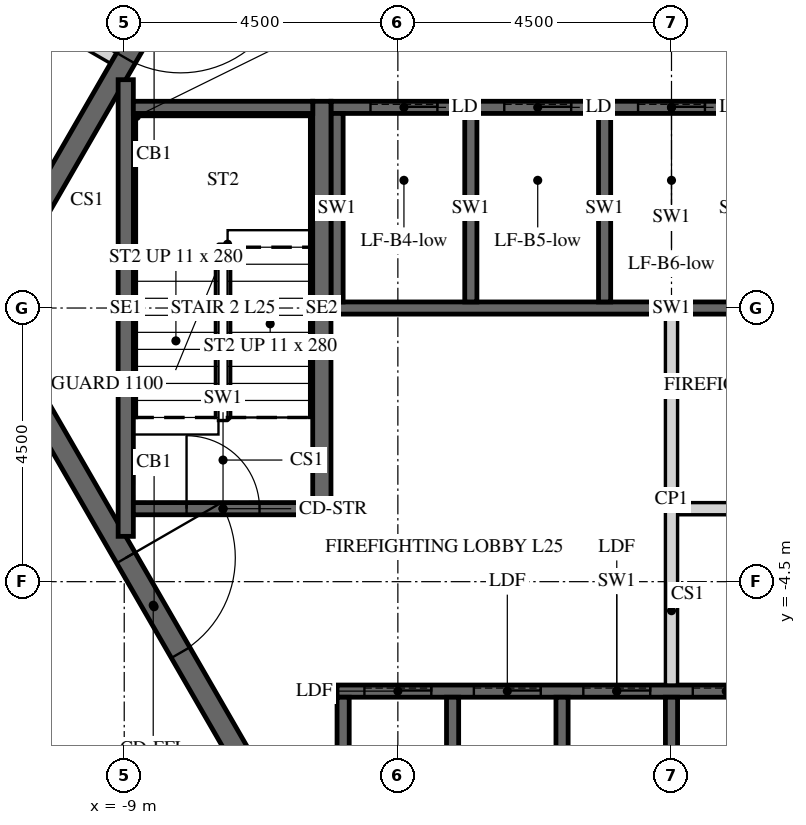
"""IFC4 building model, lengths in metres.
Left out: names, types, materials, properties, quantities, classifications, styles, units other than length and angle.
Written with IfcOpenShell. Run it as: python <this file> out.ifc"""

import sys

from ifc_helpers import new_model, si_unit, direction, frame, frame_2d, origin, place, context, subcontext, project, spatial, polyline, rectangle, outline, extrude, element, fill, save


model = new_model("IFC4")
c1 = context("Model", 3, precision=1e-05, world=origin(), true_north=direction((0.0, 1.0)))
c2 = subcontext(c1, "Body", "Model", "MODEL_VIEW")
j1 = project(units=[si_unit("LENGTHUNIT", "METRE"), si_unit("PLANEANGLEUNIT", "RADIAN")], contexts=[c1])
p1 = place(None, origin())
s1 = spatial("IfcSite", under=j1, at=p1, CompositionType="ELEMENT")
p2 = place(p1, origin())
s2 = spatial("IfcBuilding", under=s1, at=p2, CompositionType="ELEMENT")
p3 = place(p2, frame((0.0, 0.0, 111.6)))
s3 = spatial("IfcBuildingStorey", under=s2, at=p3, CompositionType="ELEMENT", Elevation=111.6)
p4 = place(p3, frame((-7.91, 13.7, -0.15), z_axis=(0.0, 0.0, 1.0), x_axis=(-0.499999880136, -0.866025472988, 0.0)))
e1 = element("IfcWall", 1, at=p4, inside=s3, PredefinedType="SHEAR", context=c2, shape_type="SweptSolid", body=[
    extrude(outline(polyline([(-0.173, -0.3), (15.993, -0.3), (15.646, 0.3), (0.173, 0.3), (-0.173, -0.3)])), origin(), (0.0, 0.0, 1.0), 3.9),
])
p5 = place(p4, frame((7.039, 0.0, 0.15)))
e2 = element("IfcOpeningElement", 2, at=p5, cuts=e1, PredefinedType="OPENING", context=c2, shape_type="SweptSolid", body=[
    extrude(rectangle(XDim=1.8, YDim=2.4, at=frame_2d((0.9, 1.2))), frame((0.0, 0.31, 0.0), z_axis=(0.0, -1.0, 0.0), x_axis=(1.0, 0.0, 0.0)), (0.0, 0.0, 1.0), 0.62),
])
p6 = place(p3, frame((-15.819, 0.0, -0.15), z_axis=(0.0, 0.0, 1.0), x_axis=(0.499999880136, -0.866025472988, 0.0)))
e3 = element("IfcWall", 3, at=p6, inside=s3, PredefinedType="SHEAR", context=c2, shape_type="SweptSolid", body=[
    extrude(outline(polyline([(-0.173, -0.3), (15.993, -0.3), (15.646, 0.3), (0.173, 0.3), (-0.173, -0.3)])), origin(), (0.0, 0.0, 1.0), 3.9),
])
p7 = place(p6, frame((6.981, 0.0, 0.15)))
e4 = element("IfcOpeningElement", 4, at=p7, cuts=e3, PredefinedType="OPENING", context=c2, shape_type="SweptSolid", body=[
    extrude(rectangle(XDim=1.8, YDim=2.4, at=frame_2d((0.9, 1.2))), frame((0.0, 0.31, 0.0), z_axis=(0.0, -1.0, 0.0), x_axis=(1.0, 0.0, 0.0)), (0.0, 0.0, 1.0), 0.62),
])
p8 = place(p3, frame((-5.673, 9.825, -0.15), z_axis=(0.0, 0.0, 1.0), x_axis=(-0.499995046907, -0.866028263435, 0.0)))
e5 = element("IfcWall", 5, at=p8, inside=s3, PredefinedType="SHEAR", context=c2, shape_type="SweptSolid", body=[
    extrude(outline(polyline([(-0.101, -0.175), (11.446, -0.175), (11.244, 0.175), (0.101, 0.175), (-0.101, -0.175)])), origin(), (0.0, 0.0, 1.0), 3.9),
])
p9 = place(p8, frame((4.801, 0.0, 0.15)))
e6 = element("IfcOpeningElement", 6, at=p9, cuts=e5, PredefinedType="OPENING", context=c2, shape_type="SweptSolid", body=[
    extrude(rectangle(XDim=1.8, YDim=2.4, at=frame_2d((0.9, 1.2))), frame((0.0, 0.185, 0.0), z_axis=(0.0, -1.0, 0.0), x_axis=(1.0, 0.0, 0.0)), (0.0, 0.0, 1.0), 0.37),
])
p10 = place(p3, frame((-11.345, 0.0, -0.15), z_axis=(0.0, 0.0, 1.0), x_axis=(0.499995046907, -0.866028263435, 0.0)))
e7 = element("IfcWall", 7, at=p10, inside=s3, PredefinedType="SHEAR", context=c2, shape_type="SweptSolid", body=[
    extrude(outline(polyline([(-0.101, -0.175), (11.446, -0.175), (11.244, 0.175), (0.101, 0.175), (-0.101, -0.175)])), origin(), (0.0, 0.0, 1.0), 3.9),
])
p11 = place(p10, frame((4.744, 0.0, 0.15)))
e8 = element("IfcOpeningElement", 8, at=p11, cuts=e7, PredefinedType="OPENING", context=c2, shape_type="SweptSolid", body=[
    extrude(rectangle(XDim=1.8, YDim=2.4, at=frame_2d((0.9, 1.2))), frame((0.0, 0.185, 0.0), z_axis=(0.0, -1.0, 0.0), x_axis=(1.0, 0.0, 0.0)), (0.0, 0.0, 1.0), 0.37),
])
p12 = place(p3, frame((-5.6, 3.3, -0.25), z_axis=(0.0, 0.0, 1.0), x_axis=(1.0, 0.0, 0.0)))
e9 = element("IfcWall", 9, at=p12, inside=s3, PredefinedType="SHEAR", context=c2, shape_type="SweptSolid", body=[
    extrude(rectangle(XDim=11.2, YDim=0.2, at=frame_2d((5.6, 0.0))), origin(), (0.0, 0.0, 1.0), 3.9),
])
p13 = place(p12, frame((0.65, 0.0, 0.25)))
e10 = element("IfcOpeningElement", 10, at=p13, cuts=e9, PredefinedType="OPENING", context=c2, shape_type="SweptSolid", body=[
    extrude(rectangle(XDim=1.1, YDim=2.1, at=frame_2d((0.55, 1.05))), frame((0.0, 0.11, 0.0), z_axis=(0.0, -1.0, 0.0), x_axis=(1.0, 0.0, 0.0)), (0.0, 0.0, 1.0), 0.22),
])
p14 = place(p12, frame((2.85, 0.0, 0.25)))
e11 = element("IfcOpeningElement", 11, at=p14, cuts=e9, PredefinedType="OPENING", context=c2, shape_type="SweptSolid", body=[
    extrude(rectangle(XDim=1.1, YDim=2.1, at=frame_2d((0.55, 1.05))), frame((0.0, 0.11, 0.0), z_axis=(0.0, -1.0, 0.0), x_axis=(1.0, 0.0, 0.0)), (0.0, 0.0, 1.0), 0.22),
])
p15 = place(p12, frame((5.05, 0.0, 0.25)))
e12 = element("IfcOpeningElement", 12, at=p15, cuts=e9, PredefinedType="OPENING", context=c2, shape_type="SweptSolid", body=[
    extrude(rectangle(XDim=1.1, YDim=2.1, at=frame_2d((0.55, 1.05))), frame((0.0, 0.11, 0.0), z_axis=(0.0, -1.0, 0.0), x_axis=(1.0, 0.0, 0.0)), (0.0, 0.0, 1.0), 0.22),
])
p16 = place(p12, frame((7.25, 0.0, 0.25)))
e13 = element("IfcOpeningElement", 13, at=p16, cuts=e9, PredefinedType="OPENING", context=c2, shape_type="SweptSolid", body=[
    extrude(rectangle(XDim=1.1, YDim=2.1, at=frame_2d((0.55, 1.05))), frame((0.0, 0.11, 0.0), z_axis=(0.0, -1.0, 0.0), x_axis=(1.0, 0.0, 0.0)), (0.0, 0.0, 1.0), 0.22),
])
p17 = place(p12, frame((9.45, 0.0, 0.25)))
e14 = element("IfcOpeningElement", 14, at=p17, cuts=e9, PredefinedType="OPENING", context=c2, shape_type="SweptSolid", body=[
    extrude(rectangle(XDim=1.1, YDim=2.1, at=frame_2d((0.55, 1.05))), frame((0.0, 0.11, 0.0), z_axis=(0.0, -1.0, 0.0), x_axis=(1.0, 0.0, 0.0)), (0.0, 0.0, 1.0), 0.22),
])
p18 = place(p3, frame((-5.6, 0.0, -0.25), z_axis=(0.0, 0.0, 1.0), x_axis=(1.0, 0.0, 0.0)))
e15 = element("IfcWall", 15, at=p18, inside=s3, PredefinedType="SHEAR", context=c2, shape_type="SweptSolid", body=[
    extrude(rectangle(XDim=11.2, YDim=0.2, at=frame_2d((5.6, 0.0))), origin(), (0.0, 0.0, 1.0), 3.9),
])
for number, where, z_axis, x_axis in (
    (16, (-5.5, 0.1, -0.25), (0.0, 0.0, 1.0), (0.0, 1.0, 0.0)),
    (17, (-3.3, 0.1, -0.25), (0.0, 0.0, 1.0), (0.0, 1.0, 0.0)),
    (18, (-1.1, 0.1, -0.25), (0.0, 0.0, 1.0), (0.0, 1.0, 0.0)),
):
    element("IfcWall", number, at=place(p3, frame(where, z_axis=z_axis, x_axis=x_axis)), inside=s3, PredefinedType="SHEAR", context=c2, shape_type="SweptSolid", body=[
        extrude(rectangle(XDim=3.1, YDim=0.2, at=frame_2d((1.55, 0.0))), origin(), (0.0, 0.0, 1.0), 3.9),
    ])
p19 = place(p3, frame((-5.5, -6.3, -0.25), z_axis=(0.0, 0.0, 1.0), x_axis=(1.0, 0.0, 0.0)))
e19 = element("IfcWall", 19, at=p19, inside=s3, PredefinedType="SHEAR", context=c2, shape_type="SweptSolid", body=[
    extrude(rectangle(XDim=9.2, YDim=0.2, at=frame_2d((4.6, 0.0))), origin(), (0.0, 0.0, 1.0), 3.9),
])
p20 = place(p19, frame((0.45, 0.0, 0.25)))
e20 = element("IfcOpeningElement", 20, at=p20, cuts=e19, PredefinedType="OPENING", context=c2, shape_type="SweptSolid", body=[
    extrude(rectangle(XDim=1.1, YDim=2.1, at=frame_2d((0.55, 1.05))), frame((0.0, 0.11, 0.0), z_axis=(0.0, -1.0, 0.0), x_axis=(1.0, 0.0, 0.0)), (0.0, 0.0, 1.0), 0.22),
])
p21 = place(p19, frame((2.25, 0.0, 0.25)))
e21 = element("IfcOpeningElement", 21, at=p21, cuts=e19, PredefinedType="OPENING", context=c2, shape_type="SweptSolid", body=[
    extrude(rectangle(XDim=1.1, YDim=2.1, at=frame_2d((0.55, 1.05))), frame((0.0, 0.11, 0.0), z_axis=(0.0, -1.0, 0.0), x_axis=(1.0, 0.0, 0.0)), (0.0, 0.0, 1.0), 0.22),
])
p22 = place(p19, frame((4.05, 0.0, 0.25)))
e22 = element("IfcOpeningElement", 22, at=p22, cuts=e19, PredefinedType="OPENING", context=c2, shape_type="SweptSolid", body=[
    extrude(rectangle(XDim=1.1, YDim=2.1, at=frame_2d((0.55, 1.05))), frame((0.0, 0.11, 0.0), z_axis=(0.0, -1.0, 0.0), x_axis=(1.0, 0.0, 0.0)), (0.0, 0.0, 1.0), 0.22),
])
p23 = place(p19, frame((5.85, 0.0, 0.25)))
e23 = element("IfcOpeningElement", 23, at=p23, cuts=e19, PredefinedType="OPENING", context=c2, shape_type="SweptSolid", body=[
    extrude(rectangle(XDim=1.1, YDim=2.1, at=frame_2d((0.55, 1.05))), frame((0.0, 0.11, 0.0), z_axis=(0.0, -1.0, 0.0), x_axis=(1.0, 0.0, 0.0)), (0.0, 0.0, 1.0), 0.22),
])
p24 = place(p19, frame((7.65, 0.0, 0.25)))
e24 = element("IfcOpeningElement", 24, at=p24, cuts=e19, PredefinedType="OPENING", context=c2, shape_type="SweptSolid", body=[
    extrude(rectangle(XDim=1.1, YDim=2.1, at=frame_2d((0.55, 1.05))), frame((0.0, 0.11, 0.0), z_axis=(0.0, -1.0, 0.0), x_axis=(1.0, 0.0, 0.0)), (0.0, 0.0, 1.0), 0.22),
])
for number, where, z_axis, x_axis in (
    (25, (-5.4, -9.3, -0.25), (0.0, 0.0, 1.0), (0.0, 1.0, 0.0)),
    (26, (-3.6, -9.3, -0.25), (0.0, 0.0, 1.0), (0.0, 1.0, 0.0)),
    (27, (-1.8, -9.3, -0.25), (0.0, 0.0, 1.0), (0.0, 1.0, 0.0)),
    (28, (0.0, -9.3, -0.25), (0.0, 0.0, 1.0), (0.0, 1.0, 0.0)),
):
    element("IfcWall", number, at=place(p3, frame(where, z_axis=z_axis, x_axis=x_axis)), inside=s3, PredefinedType="SHEAR", context=c2, shape_type="SweptSolid", body=[
        extrude(rectangle(XDim=2.9, YDim=0.2, at=frame_2d((1.45, 0.0))), origin(), (0.0, 0.0, 1.0), 3.9),
    ])
p25 = place(p3, frame((0.1, -3.3, 0.0), z_axis=(0.0, 0.0, 1.0), x_axis=(1.0, 0.0, 0.0)))
e29 = element("IfcWall", 29, at=p25, inside=s3, PredefinedType="PARTITIONING", context=c2, shape_type="SweptSolid", body=[
    extrude(rectangle(XDim=5.5, YDim=0.2, at=frame_2d((2.75, 0.0))), origin(), (0.0, 0.0, 1.0), 3.65),
])
p26 = place(p25, frame((2.3, 0.0, 0.0)))
e30 = element("IfcOpeningElement", 30, at=p26, cuts=e29, PredefinedType="OPENING", context=c2, shape_type="SweptSolid", body=[
    extrude(rectangle(XDim=0.9, YDim=2.1, at=frame_2d((0.45, 1.05))), frame((0.0, 0.11, 0.0), z_axis=(0.0, -1.0, 0.0), x_axis=(1.0, 0.0, 0.0)), (0.0, 0.0, 1.0), 0.22),
])
p27 = place(p3, frame((0.0, -6.2, 0.0), z_axis=(0.0, 0.0, 1.0), x_axis=(0.0, 1.0, 0.0)))
e31 = element("IfcWall", 31, at=p27, inside=s3, PredefinedType="PARTITIONING", context=c2, shape_type="SweptSolid", body=[
    extrude(rectangle(XDim=6.1, YDim=0.2, at=frame_2d((3.05, 0.0))), origin(), (0.0, 0.0, 1.0), 3.65),
])
p28 = place(p3, frame((-9.175, 4.109, 0.0), z_axis=(0.0, 0.0, 1.0), x_axis=(-0.865989465428, 0.500062241894, 0.0)))
e32 = element("IfcWall", 32, at=p28, inside=s3, PredefinedType="PARTITIONING", context=c2, shape_type="SweptSolid", body=[
    extrude(rectangle(XDim=3.4, YDim=0.2, at=frame_2d((1.7, 0.0))), origin(), (0.0, 0.0, 1.0), 3.65),
])
p29 = place(p28, frame((1.351, 0.0, 0.0)))
e33 = element("IfcOpeningElement", 33, at=p29, cuts=e32, PredefinedType="OPENING", context=c2, shape_type="SweptSolid", body=[
    extrude(rectangle(XDim=0.9, YDim=2.1, at=frame_2d((0.45, 1.05))), frame((0.0, 0.11, 0.0), z_axis=(0.0, -1.0, 0.0), x_axis=(1.0, 0.0, 0.0)), (0.0, 0.0, 1.0), 0.22),
])
p30 = place(p3, frame((-5.75, -3.4, -0.25), z_axis=(0.0, 0.0, 1.0), x_axis=(0.0, 1.0, 0.0)))
e34 = element("IfcWall", 34, at=p30, inside=s3, PredefinedType="SHEAR", context=c2, shape_type="SweptSolid", body=[
    extrude(rectangle(XDim=6.8, YDim=0.3, at=frame_2d((3.4, 0.0))), origin(), (0.0, 0.0, 1.0), 3.9),
])
p31 = place(p3, frame((-8.975, -3.755, -0.25), z_axis=(0.0, 0.0, 1.0), x_axis=(0.0, 1.0, 0.0)))
e35 = element("IfcWall", 35, at=p31, inside=s3, PredefinedType="SHEAR", context=c2, shape_type="SweptSolid", body=[
    extrude(rectangle(XDim=7.51, YDim=0.25, at=frame_2d((3.755, 0.0))), origin(), (0.0, 0.0, 1.0), 3.9),
])
p32 = place(p3, frame((-8.85, 3.3, -0.25), z_axis=(0.0, 0.0, 1.0), x_axis=(1.0, 0.0, 0.0)))
e36 = element("IfcWall", 36, at=p32, inside=s3, PredefinedType="SHEAR", context=c2, shape_type="SweptSolid", body=[
    extrude(rectangle(XDim=2.95, YDim=0.2, at=frame_2d((1.475, 0.0))), origin(), (0.0, 0.0, 1.0), 3.9),
])
p33 = place(p3, frame((-8.85, -3.3, -0.25), z_axis=(0.0, 0.0, 1.0), x_axis=(1.0, 0.0, 0.0)))
e37 = element("IfcWall", 37, at=p33, inside=s3, PredefinedType="SHEAR", context=c2, shape_type="SweptSolid", body=[
    extrude(rectangle(XDim=2.95, YDim=0.2, at=frame_2d((1.475, 0.0))), origin(), (0.0, 0.0, 1.0), 3.9),
])
p34 = place(p33, frame((0.875, 0.0, 0.25)))
e38 = element("IfcOpeningElement", 38, at=p34, cuts=e37, PredefinedType="OPENING", context=c2, shape_type="SweptSolid", body=[
    extrude(rectangle(XDim=1.2, YDim=2.4, at=frame_2d((0.6, 1.2))), frame((0.0, 0.11, 0.0), z_axis=(0.0, -1.0, 0.0), x_axis=(1.0, 0.0, 0.0)), (0.0, 0.0, 1.0), 0.22),
])
p35 = place(p9, origin())
e39 = element("IfcDoor", 39, at=p35, inside=s3, OperationType="DOUBLE_DOOR_SINGLE_SWING", PredefinedType="DOOR", context=c2, shape_type="SweptSolid", body=[
    extrude(rectangle(XDim=1.8, YDim=2.4, at=frame_2d((0.9, 1.2))), frame((0.0, 0.025, 0.0), z_axis=(0.0, -1.0, 0.0), x_axis=(1.0, 0.0, 0.0)), (0.0, 0.0, 1.0), 0.05),
])
fill(e6, e39)
p36 = place(p11, origin())
e40 = element("IfcDoor", 40, at=p36, inside=s3, OperationType="DOUBLE_DOOR_SINGLE_SWING", PredefinedType="DOOR", context=c2, shape_type="SweptSolid", body=[
    extrude(rectangle(XDim=1.8, YDim=2.4, at=frame_2d((0.9, 1.2))), frame((0.0, 0.025, 0.0), z_axis=(0.0, -1.0, 0.0), x_axis=(1.0, 0.0, 0.0)), (0.0, 0.0, 1.0), 0.05),
])
fill(e8, e40)
p37 = place(p34, origin())
e41 = element("IfcDoor", 41, at=p37, inside=s3, OperationType="SINGLE_SWING_LEFT", PredefinedType="DOOR", context=c2, shape_type="SweptSolid", body=[
    extrude(rectangle(XDim=1.2, YDim=2.4, at=frame_2d((0.6, 1.2))), frame((0.0, 0.025, 0.0), z_axis=(0.0, -1.0, 0.0), x_axis=(1.0, 0.0, 0.0)), (0.0, 0.0, 1.0), 0.05),
])
fill(e38, e41)
p38 = place(p13, origin())
e42 = element("IfcDoor", 42, at=p38, inside=s3, OperationType="SLIDING_TO_LEFT", PredefinedType="DOOR", context=c2, shape_type="SweptSolid", body=[
    extrude(rectangle(XDim=1.1, YDim=2.1, at=frame_2d((0.55, 1.05))), frame((0.0, 0.025, 0.0), z_axis=(0.0, -1.0, 0.0), x_axis=(1.0, 0.0, 0.0)), (0.0, 0.0, 1.0), 0.05),
])
fill(e10, e42)
p39 = place(p14, origin())
e43 = element("IfcDoor", 43, at=p39, inside=s3, OperationType="SLIDING_TO_LEFT", PredefinedType="DOOR", context=c2, shape_type="SweptSolid", body=[
    extrude(rectangle(XDim=1.1, YDim=2.1, at=frame_2d((0.55, 1.05))), frame((0.0, 0.025, 0.0), z_axis=(0.0, -1.0, 0.0), x_axis=(1.0, 0.0, 0.0)), (0.0, 0.0, 1.0), 0.05),
])
fill(e11, e43)
p40 = place(p15, origin())
e44 = element("IfcDoor", 44, at=p40, inside=s3, OperationType="SLIDING_TO_LEFT", PredefinedType="DOOR", context=c2, shape_type="SweptSolid", body=[
    extrude(rectangle(XDim=1.1, YDim=2.1, at=frame_2d((0.55, 1.05))), frame((0.0, 0.025, 0.0), z_axis=(0.0, -1.0, 0.0), x_axis=(1.0, 0.0, 0.0)), (0.0, 0.0, 1.0), 0.05),
])
fill(e12, e44)
p41 = place(p20, origin())
e45 = element("IfcDoor", 45, at=p41, inside=s3, OperationType="SLIDING_TO_LEFT", PredefinedType="DOOR", context=c2, shape_type="SweptSolid", body=[
    extrude(rectangle(XDim=1.1, YDim=2.1, at=frame_2d((0.55, 1.05))), frame((0.0, 0.025, 0.0), z_axis=(0.0, -1.0, 0.0), x_axis=(1.0, 0.0, 0.0)), (0.0, 0.0, 1.0), 0.05),
])
fill(e20, e45)
p42 = place(p21, origin())
e46 = element("IfcDoor", 46, at=p42, inside=s3, OperationType="SLIDING_TO_LEFT", PredefinedType="DOOR", context=c2, shape_type="SweptSolid", body=[
    extrude(rectangle(XDim=1.1, YDim=2.1, at=frame_2d((0.55, 1.05))), frame((0.0, 0.025, 0.0), z_axis=(0.0, -1.0, 0.0), x_axis=(1.0, 0.0, 0.0)), (0.0, 0.0, 1.0), 0.05),
])
fill(e21, e46)
p43 = place(p22, origin())
e47 = element("IfcDoor", 47, at=p43, inside=s3, OperationType="SLIDING_TO_LEFT", PredefinedType="DOOR", context=c2, shape_type="SweptSolid", body=[
    extrude(rectangle(XDim=1.1, YDim=2.1, at=frame_2d((0.55, 1.05))), frame((0.0, 0.025, 0.0), z_axis=(0.0, -1.0, 0.0), x_axis=(1.0, 0.0, 0.0)), (0.0, 0.0, 1.0), 0.05),
])
fill(e22, e47)
p44 = place(p23, origin())
e48 = element("IfcDoor", 48, at=p44, inside=s3, OperationType="SLIDING_TO_LEFT", PredefinedType="DOOR", context=c2, shape_type="SweptSolid", body=[
    extrude(rectangle(XDim=1.1, YDim=2.1, at=frame_2d((0.55, 1.05))), frame((0.0, 0.025, 0.0), z_axis=(0.0, -1.0, 0.0), x_axis=(1.0, 0.0, 0.0)), (0.0, 0.0, 1.0), 0.05),
])
fill(e23, e48)
save(model, sys.argv[1])
